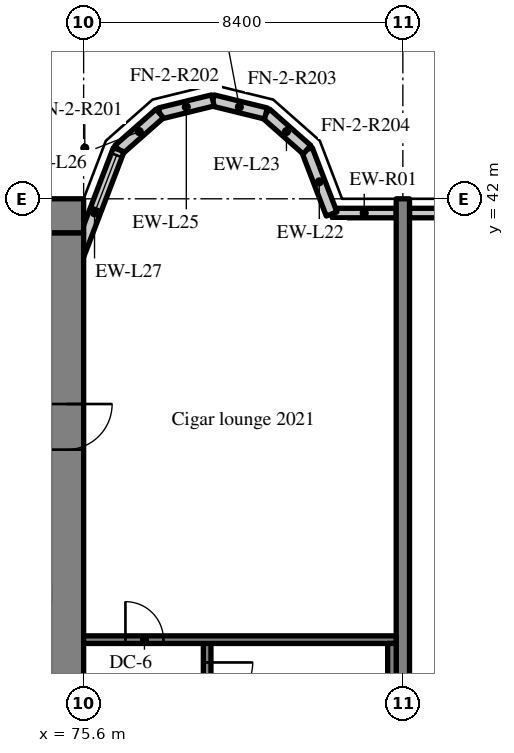
"""IFC4 building model, lengths in metres.
Left out: names, types, materials, properties, quantities, classifications, styles, units other than length and angle.
Written with IfcOpenShell. Run it as: python <this file> out.ifc"""

import sys

from ifc_helpers import new_model, si_unit, direction, frame, frame_2d, origin, place, context, subcontext, project, spatial, rectangle, extrude, source, transform, mapped, element, fill, save


model = new_model("IFC4")
c1 = context("Model", 3, precision=1e-05, world=origin(), true_north=direction((0.0, 1.0)))
c2 = subcontext(c1, "Body", "Model", "MODEL_VIEW")
j1 = project(units=[si_unit("LENGTHUNIT", "METRE"), si_unit("PLANEANGLEUNIT", "RADIAN")], contexts=[c1])
p1 = place(None, origin())
s1 = spatial("IfcSite", under=j1, at=p1, CompositionType="ELEMENT")
p2 = place(p1, origin())
s2 = spatial("IfcBuilding", under=s1, at=p2, CompositionType="ELEMENT")
p3 = place(p2, frame((0.0, 0.0, 86.4)))
s3 = spatial("IfcBuildingStorey", under=s2, at=p3, CompositionType="ELEMENT", Elevation=86.4)
m1 = source(origin(), c2, "Body", "SweptSolid", [
    extrude(rectangle(XDim=50.4, YDim=0.9, at=frame_2d((25.2, 0.0))), origin(), (0.0, 0.0, 1.0), 4.72),
])
p4 = place(p3, frame((25.2, 41.55, 0.0), z_axis=(0.0, 0.0, 1.0), x_axis=(1.0, 0.0, 0.0)))
e1 = element("IfcWall", 1, at=p4, inside=s3, PredefinedType="SHEAR", context=c2, shape_type="MappedRepresentation", body=[
    mapped(m1, transform((0.0, 0.0, 0.0), scale=1.0)),
])
m2 = source(origin(), c2, "Body", "SweptSolid", [
    extrude(rectangle(XDim=18.2, YDim=0.9, at=frame_2d((9.1, 0.0))), origin(), (0.0, 0.0, 1.0), 4.72),
])
p5 = place(p3, frame((75.15, 22.9, 0.0), z_axis=(0.0, 0.0, 1.0), x_axis=(0.0, 1.0, 0.0)))
e2 = element("IfcWall", 2, at=p5, inside=s3, PredefinedType="SHEAR", context=c2, shape_type="MappedRepresentation", body=[
    mapped(m2, transform((0.0, 0.0, 0.0), scale=1.0)),
])
m3 = source(origin(), c2, "Body", "SweptSolid", [
    extrude(rectangle(XDim=1.2, YDim=2.1, at=frame_2d((0.6, 1.05))), frame((0.0, 0.46, 0.0), z_axis=(0.0, -1.0, 0.0), x_axis=(1.0, 0.0, 0.0)), (0.0, 0.0, 1.0), 0.92),
])
p6 = place(p5, frame((12.5, 0.0, 0.0)))
e3 = element("IfcOpeningElement", 3, at=p6, cuts=e2, PredefinedType="OPENING", context=c2, shape_type="MappedRepresentation", body=[
    mapped(m3, transform((0.0, 0.0, 0.0), scale=1.0)),
])
m4 = source(origin(), c2, "Body", "SweptSolid", [
    extrude(rectangle(XDim=20.0, YDim=0.35, at=frame_2d((10.0, 0.0))), origin(), (0.0, 0.0, 1.0), 4.72),
])
p7 = place(p3, frame((84.0, 22.0, 0.0), z_axis=(0.0, 0.0, 1.0), x_axis=(0.0, 1.0, 0.0)))
e4 = element("IfcWall", 4, at=p7, inside=s3, PredefinedType="SHEAR", context=c2, shape_type="MappedRepresentation", body=[
    mapped(m4, transform((0.0, 0.0, 0.0), scale=1.0)),
])
m5 = source(origin(), c2, "Body", "SweptSolid", [
    extrude(rectangle(XDim=1.683, YDim=0.25, at=frame_2d((0.841, 0.0))), origin(), (0.0, 0.0, 1.0), 4.02),
])
p8 = place(p3, frame((83.825, 41.625, 0.0), z_axis=(0.0, 0.0, 1.0), x_axis=(-1.0, 0.0, 0.0)))
e5 = element("IfcWall", 5, at=p8, inside=s3, PredefinedType="SOLIDWALL", context=c2, shape_type="MappedRepresentation", body=[
    mapped(m5, transform((0.0, 0.0, 0.0), scale=1.0)),
])
m6 = source(origin(), c2, "Body", "SweptSolid", [
    extrude(rectangle(XDim=3.675, YDim=0.25, at=frame_2d((1.837, 0.0))), origin(), (0.0, 0.0, 1.0), 4.02),
])
p9 = place(p3, frame((87.85, 41.625, 0.0), z_axis=(0.0, 0.0, 1.0), x_axis=(-1.0, 0.0, 0.0)))
e6 = element("IfcWall", 6, at=p9, inside=s3, PredefinedType="SOLIDWALL", context=c2, shape_type="MappedRepresentation", body=[
    mapped(m6, transform((0.0, 0.0, 0.0), scale=1.0)),
])
m7 = source(origin(), c2, "Body", "SweptSolid", [
    extrude(rectangle(XDim=1.5, YDim=1.5, at=frame_2d((0.75, 0.75))), frame((0.0, 0.135, 0.0), z_axis=(0.0, -1.0, 0.0), x_axis=(1.0, 0.0, 0.0)), (0.0, 0.0, 1.0), 0.27),
])
p10 = place(p9, frame((1.087, 0.0, 0.9)))
e7 = element("IfcOpeningElement", 7, at=p10, cuts=e6, PredefinedType="OPENING", context=c2, shape_type="MappedRepresentation", body=[
    mapped(m7, transform((0.0, 0.0, 0.0), scale=1.0)),
])
m8 = source(origin(), c2, "Body", "SweptSolid", [
    extrude(rectangle(XDim=1.812, YDim=0.3, at=frame_2d((0.906, 0.0))), origin(), (0.0, 0.0, 1.0), 4.72),
])
p11 = place(p3, frame((82.125, 41.6, 0.0), z_axis=(0.0, 0.0, 1.0), x_axis=(-0.357877270961, 0.93376863244, 0.0)))
e8 = element("IfcWall", 8, at=p11, inside=s3, PredefinedType="SOLIDWALL", context=c2, shape_type="MappedRepresentation", body=[
    mapped(m8, transform((0.0, 0.0, 0.0), scale=1.0)),
])
m9 = source(origin(), c2, "Body", "SweptSolid", [
    extrude(rectangle(XDim=1.44, YDim=0.3, at=frame_2d((0.72, 0.0))), origin(), (0.0, 0.0, 1.0), 4.72),
])
p12 = place(p3, frame((81.477, 43.292, 0.0), z_axis=(0.0, 0.0, 1.0), x_axis=(-0.74957555648, 0.661918790432, 0.0)))
e9 = element("IfcWall", 9, at=p12, inside=s3, PredefinedType="SOLIDWALL", context=c2, shape_type="MappedRepresentation", body=[
    mapped(m9, transform((0.0, 0.0, 0.0), scale=1.0)),
])
m10 = source(origin(), c2, "Body", "SweptSolid", [
    extrude(rectangle(XDim=1.439, YDim=0.3, at=frame_2d((0.719, 0.0))), origin(), (0.0, 0.0, 1.0), 4.72),
])
for number, where, z_axis, x_axis in (
    (10, (80.397, 44.245, 0.0), (0.0, 0.0, 1.0), (-0.971, 0.238, 0.0)),
    (11, (79.0, 44.588, 0.0), (0.0, 0.0, 1.0), (-0.971, -0.238, 0.0)),
):
    element("IfcWall", number, at=place(p3, frame(where, z_axis=z_axis, x_axis=x_axis)), inside=s3, PredefinedType="SOLIDWALL", context=c2, shape_type="MappedRepresentation", body=[
        mapped(m10, transform((0.0, 0.0, 0.0), scale=1.0)),
    ])
p13 = place(p3, frame((77.603, 44.245, 0.0), z_axis=(0.0, 0.0, 1.0), x_axis=(-0.74957555648, -0.661918790432, 0.0)))
e12 = element("IfcWall", 12, at=p13, inside=s3, PredefinedType="SOLIDWALL", context=c2, shape_type="MappedRepresentation", body=[
    mapped(m9, transform((0.0, 0.0, 0.0), scale=1.0)),
])
m11 = source(origin(), c2, "Body", "SweptSolid", [
    extrude(rectangle(XDim=3.559, YDim=0.3, at=frame_2d((1.78, 0.0))), origin(), (0.0, 0.0, 1.0), 4.72),
])
p14 = place(p3, frame((76.523, 43.292, 0.0), z_axis=(0.0, 0.0, 1.0), x_axis=(-0.35779745313, -0.933799219604, 0.0)))
e13 = element("IfcWall", 13, at=p14, inside=s3, PredefinedType="SOLIDWALL", context=c2, shape_type="MappedRepresentation", body=[
    mapped(m11, transform((0.0, 0.0, 0.0), scale=1.0)),
])
m12 = source(origin(), c2, "Body", "SweptSolid", [
    extrude(rectangle(XDim=1.5, YDim=2.0, at=frame_2d((0.75, 1.0))), frame((0.0, 0.16, 0.0), z_axis=(0.0, -1.0, 0.0), x_axis=(1.0, 0.0, 0.0)), (0.0, 0.0, 1.0), 0.32),
])
p15 = place(p14, frame((0.156, 0.0, 0.9)))
e14 = element("IfcOpeningElement", 14, at=p15, cuts=e13, PredefinedType="OPENING", context=c2, shape_type="MappedRepresentation", body=[
    mapped(m12, transform((0.0, 0.0, 0.0), scale=1.0)),
])
m13 = source(origin(), c2, "Body", "SweptSolid", [
    extrude(rectangle(XDim=8.3, YDim=0.2, at=frame_2d((4.15, 0.0))), origin(), (0.0, 0.0, 1.0), 4.72),
])
p16 = place(p3, frame((78.85, 22.1, 0.0), z_axis=(0.0, 0.0, 1.0), x_axis=(0.0, 1.0, 0.0)))
e15 = element("IfcWall", 15, at=p16, inside=s3, PredefinedType="SOLIDWALL", context=c2, shape_type="MappedRepresentation", body=[
    mapped(m13, transform((0.0, 0.0, 0.0), scale=1.0)),
])
m14 = source(origin(), c2, "Body", "SweptSolid", [
    extrude(rectangle(XDim=1.2, YDim=2.1, at=frame_2d((0.6, 1.05))), frame((0.0, 0.11, 0.0), z_axis=(0.0, -1.0, 0.0), x_axis=(1.0, 0.0, 0.0)), (0.0, 0.0, 1.0), 0.22),
])
p17 = place(p16, frame((6.5, 0.0, 0.0)))
e16 = element("IfcOpeningElement", 16, at=p17, cuts=e15, PredefinedType="OPENING", context=c2, shape_type="MappedRepresentation", body=[
    mapped(m14, transform((0.0, 0.0, 0.0), scale=1.0)),
])
m15 = source(origin(), c2, "Body", "SweptSolid", [
    extrude(rectangle(XDim=8.225, YDim=0.2, at=frame_2d((4.112, 0.0))), origin(), (0.0, 0.0, 1.0), 4.72),
])
p18 = place(p3, frame((83.825, 30.4, 0.0), z_axis=(0.0, 0.0, 1.0), x_axis=(-1.0, 0.0, 0.0)))
e17 = element("IfcWall", 17, at=p18, inside=s3, PredefinedType="SOLIDWALL", context=c2, shape_type="MappedRepresentation", body=[
    mapped(m15, transform((0.0, 0.0, 0.0), scale=1.0)),
])
m16 = source(origin(), c2, "Body", "SweptSolid", [
    extrude(rectangle(XDim=1.0, YDim=2.1, at=frame_2d((0.5, 1.05))), frame((0.0, 0.11, 0.0), z_axis=(0.0, -1.0, 0.0), x_axis=(1.0, 0.0, 0.0)), (0.0, 0.0, 1.0), 0.22),
])
p19 = place(p18, frame((6.125, 0.0, 0.0)))
e18 = element("IfcOpeningElement", 18, at=p19, cuts=e17, PredefinedType="OPENING", context=c2, shape_type="MappedRepresentation", body=[
    mapped(m16, transform((0.0, 0.0, 0.0), scale=1.0)),
])
m17 = source(origin(), c2, "Body", "SweptSolid", [
    extrude(rectangle(XDim=8.1, YDim=0.225, at=frame_2d((4.05, 0.0))), origin(), (0.0, 0.0, 1.0), 4.72),
])
p20 = place(p3, frame((83.713, 22.2, 0.0), z_axis=(0.0, 0.0, 1.0), x_axis=(0.0, 1.0, 0.0)))
e19 = element("IfcWall", 19, at=p20, inside=s3, PredefinedType="SOLIDWALL", context=c2, shape_type="MappedRepresentation", body=[
    mapped(m17, transform((0.0, 0.0, 0.0), scale=1.0)),
])
m18 = source(origin(), c2, "Body", "SweptSolid", [
    extrude(rectangle(XDim=1.5, YDim=2.0, at=frame_2d((0.75, 1.0))), frame((0.0, 0.03, 0.0), z_axis=(0.0, -1.0, 0.0), x_axis=(1.0, 0.0, 0.0)), (0.0, 0.0, 1.0), 0.06),
])
p21 = place(p15, origin())
e20 = element("IfcWindow", 20, at=p21, inside=s3, PartitioningType="SINGLE_PANEL", PredefinedType="WINDOW", context=c2, shape_type="MappedRepresentation", body=[
    mapped(m18, transform((0.0, 0.0, 0.0), scale=1.0)),
])
fill(e14, e20)
m19 = source(origin(), c2, "Body", "SweptSolid", [
    extrude(rectangle(XDim=1.2, YDim=2.1, at=frame_2d((0.6, 1.05))), frame((0.0, 0.025, 0.0), z_axis=(0.0, -1.0, 0.0), x_axis=(1.0, 0.0, 0.0)), (0.0, 0.0, 1.0), 0.05),
])
p22 = place(p6, origin())
e21 = element("IfcDoor", 21, at=p22, inside=s3, OperationType="SINGLE_SWING_RIGHT", PredefinedType="DOOR", context=c2, shape_type="MappedRepresentation", body=[
    mapped(m19, transform((0.0, 0.0, 0.0), scale=1.0)),
])
fill(e3, e21)
p23 = place(p17, origin())
e22 = element("IfcDoor", 22, at=p23, inside=s3, OperationType="SINGLE_SWING_RIGHT", PredefinedType="DOOR", context=c2, shape_type="MappedRepresentation", body=[
    mapped(m19, transform((0.0, 0.0, 0.0), scale=1.0)),
])
fill(e16, e22)
m20 = source(origin(), c2, "Body", "SweptSolid", [
    extrude(rectangle(XDim=1.0, YDim=2.1, at=frame_2d((0.5, 1.05))), frame((0.0, 0.025, 0.0), z_axis=(0.0, -1.0, 0.0), x_axis=(1.0, 0.0, 0.0)), (0.0, 0.0, 1.0), 0.05),
])
p24 = place(p19, origin())
e23 = element("IfcDoor", 23, at=p24, inside=s3, OperationType="SINGLE_SWING_RIGHT", PredefinedType="DOOR", context=c2, shape_type="MappedRepresentation", body=[
    mapped(m20, transform((0.0, 0.0, 0.0), scale=1.0)),
])
fill(e18, e23)
save(model, sys.argv[1])
